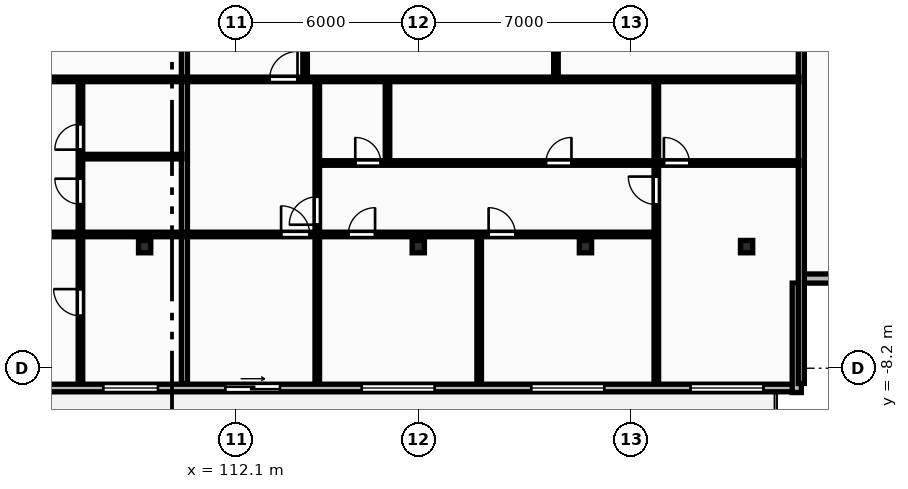
"""IFC4 building model, lengths in metres.
Left out: names, types, materials, properties, quantities, classifications, styles, units other than length and angle.
Written with IfcOpenShell. Run it as: python <this file> out.ifc"""

import sys

from ifc_helpers import new_model, si_unit, direction, frame, frame_2d, origin, origin_2d, place, context, subcontext, project, spatial, rectangle, i_section, extrude, element, fill, save


model = new_model("IFC4")
c1 = context("Model", 3, precision=1e-05, world=origin(), true_north=direction((0.0, 1.0)))
c2 = subcontext(c1, "Body", "Model", "MODEL_VIEW")
j1 = project(units=[si_unit("LENGTHUNIT", "METRE"), si_unit("PLANEANGLEUNIT", "RADIAN")], contexts=[c1])
p1 = place(None, origin())
s1 = spatial("IfcSite", under=j1, at=p1, CompositionType="ELEMENT")
p2 = place(p1, origin())
s2 = spatial("IfcBuilding", under=s1, at=p2, CompositionType="ELEMENT")
p3 = place(p2, frame((0.0, 0.0, 146.5)))
s3 = spatial("IfcBuildingStorey", under=s2, at=p3, CompositionType="ELEMENT", Elevation=146.5)
for number, where, z_axis, x_axis in (
    (1, (109.1, -4.2, 0.0), (0.0, 0.0, 1.0), (1.0, 0.0, 0.0)),
    (2, (118.1, -4.2, 0.0), (0.0, 0.0, 1.0), (1.0, 0.0, 0.0)),
    (3, (123.6, -4.2, 0.0), (0.0, 0.0, 1.0), (1.0, 0.0, 0.0)),
    (4, (128.9, -4.2, 0.0), (0.0, 0.0, 1.0), (1.0, 0.0, 0.0)),
):
    element("IfcColumn", number, at=place(p3, frame(where, z_axis=z_axis, x_axis=x_axis)), inside=s3, PredefinedType="COLUMN", context=c2, shape_type="SweptSolid", body=[
        extrude(i_section(OverallWidth=0.403, OverallDepth=0.406, WebThickness=0.027, FlangeThickness=0.043, FilletRadius=0.015, at=origin_2d()), origin(), (0.0, 0.0, 1.0), 3.6),
    ])
p4 = place(p3, frame((72.7, -8.85, 0.0), z_axis=(0.0, 0.0, 1.0), x_axis=(1.0, 0.0, 0.0)))
e5 = element("IfcWall", 5, at=p4, inside=s3, PredefinedType="STANDARD", context=c2, shape_type="SweptSolid", body=[
    extrude(rectangle(XDim=58.0, YDim=0.25, at=frame_2d((29.0, 0.0))), origin(), (0.0, 0.0, 1.0), 3.31),
])
p5 = place(p4, frame((6.835, 0.0, 0.85)))
e6 = element("IfcOpeningElement", 6, at=p5, cuts=e5, PredefinedType="OPENING", context=c2, shape_type="SweptSolid", body=[
    extrude(rectangle(XDim=2.4, YDim=1.9, at=frame_2d((1.2, 0.95))), frame((0.0, 0.135, 0.0), z_axis=(0.0, -1.0, 0.0), x_axis=(1.0, 0.0, 0.0)), (0.0, 0.0, 1.0), 0.27),
])
p6 = place(p4, frame((12.7, 0.0, 0.85)))
e7 = element("IfcOpeningElement", 7, at=p6, cuts=e5, PredefinedType="OPENING", context=c2, shape_type="SweptSolid", body=[
    extrude(rectangle(XDim=2.4, YDim=1.9, at=frame_2d((1.2, 0.95))), frame((0.0, 0.135, 0.0), z_axis=(0.0, -1.0, 0.0), x_axis=(1.0, 0.0, 0.0)), (0.0, 0.0, 1.0), 0.27),
])
p7 = place(p4, frame((1.555, 0.0, 0.0)))
e8 = element("IfcOpeningElement", 8, at=p7, cuts=e5, PredefinedType="OPENING", context=c2, shape_type="SweptSolid", body=[
    extrude(rectangle(XDim=1.8, YDim=2.2, at=frame_2d((0.9, 1.1))), frame((0.0, 0.135, 0.0), z_axis=(0.0, -1.0, 0.0), x_axis=(1.0, 0.0, 0.0)), (0.0, 0.0, 1.0), 0.27),
])
p8 = place(p4, frame((18.125, 0.0, 0.85)))
e9 = element("IfcOpeningElement", 9, at=p8, cuts=e5, PredefinedType="OPENING", context=c2, shape_type="SweptSolid", body=[
    extrude(rectangle(XDim=2.4, YDim=1.9, at=frame_2d((1.2, 0.95))), frame((0.0, 0.135, 0.0), z_axis=(0.0, -1.0, 0.0), x_axis=(1.0, 0.0, 0.0)), (0.0, 0.0, 1.0), 0.27),
])
p9 = place(p4, frame((27.429, 0.0, 0.0)))
e10 = element("IfcOpeningElement", 10, at=p9, cuts=e5, PredefinedType="OPENING", context=c2, shape_type="SweptSolid", body=[
    extrude(rectangle(XDim=1.8, YDim=2.2, at=frame_2d((0.9, 1.1))), frame((0.0, 0.135, 0.0), z_axis=(0.0, -1.0, 0.0), x_axis=(1.0, 0.0, 0.0)), (0.0, 0.0, 1.0), 0.27),
])
p10 = place(p4, frame((35.038, 0.0, 0.85)))
e11 = element("IfcOpeningElement", 11, at=p10, cuts=e5, PredefinedType="OPENING", context=c2, shape_type="SweptSolid", body=[
    extrude(rectangle(XDim=1.8, YDim=1.8, at=frame_2d((0.9, 0.9))), frame((0.0, 0.135, 0.0), z_axis=(0.0, -1.0, 0.0), x_axis=(1.0, 0.0, 0.0)), (0.0, 0.0, 1.0), 0.27),
])
p11 = place(p4, frame((43.541, 0.0, 0.85)))
e12 = element("IfcOpeningElement", 12, at=p11, cuts=e5, PredefinedType="OPENING", context=c2, shape_type="SweptSolid", body=[
    extrude(rectangle(XDim=2.4, YDim=1.9, at=frame_2d((1.2, 0.95))), frame((0.0, 0.135, 0.0), z_axis=(0.0, -1.0, 0.0), x_axis=(1.0, 0.0, 0.0)), (0.0, 0.0, 1.0), 0.27),
])
p12 = place(p4, frame((49.117, 0.0, 0.85)))
e13 = element("IfcOpeningElement", 13, at=p12, cuts=e5, PredefinedType="OPENING", context=c2, shape_type="SweptSolid", body=[
    extrude(rectangle(XDim=2.4, YDim=1.9, at=frame_2d((1.2, 0.95))), frame((0.0, 0.135, 0.0), z_axis=(0.0, -1.0, 0.0), x_axis=(1.0, 0.0, 0.0)), (0.0, 0.0, 1.0), 0.27),
])
p13 = place(p4, frame((39.053, 0.0, 0.0)))
e14 = element("IfcOpeningElement", 14, at=p13, cuts=e5, PredefinedType="OPENING", context=c2, shape_type="SweptSolid", body=[
    extrude(rectangle(XDim=1.8, YDim=2.2, at=frame_2d((0.9, 1.1))), frame((0.0, 0.135, 0.0), z_axis=(0.0, -1.0, 0.0), x_axis=(1.0, 0.0, 0.0)), (0.0, 0.0, 1.0), 0.27),
])
p14 = place(p4, frame((54.355, 0.0, 0.85)))
e15 = element("IfcOpeningElement", 15, at=p14, cuts=e5, PredefinedType="OPENING", context=c2, shape_type="SweptSolid", body=[
    extrude(rectangle(XDim=2.4, YDim=1.9, at=frame_2d((1.2, 0.95))), frame((0.0, 0.135, 0.0), z_axis=(0.0, -1.0, 0.0), x_axis=(1.0, 0.0, 0.0)), (0.0, 0.0, 1.0), 0.27),
])
for number, where, z_axis, x_axis in (
    (16, (130.55, -9.0, 0.0), (0.0, 0.0, 1.0), (0.0, 1.0, 0.0)),
    (17, (130.7, -5.25, 0.0), (0.0, 0.0, 1.0), (1.0, 0.0, 0.0)),
):
    element("IfcWall", number, at=place(p3, frame(where, z_axis=z_axis, x_axis=x_axis)), inside=s3, PredefinedType="STANDARD", context=c2, shape_type="SweptSolid", body=[
        extrude(rectangle(XDim=3.6, YDim=0.3, at=frame_2d((1.8, 0.0))), origin(), (0.0, 0.0, 1.0), 3.31),
    ])
for number, where, z_axis, x_axis in (
    (18, (130.7, -8.7, 0.0), (0.0, 0.0, 1.0), (0.0, 1.0, 0.0)),
    (19, (110.408, -8.7, 0.0), (0.0, 0.0, 1.0), (0.0, 1.0, 0.0)),
):
    element("IfcWall", number, at=place(p3, frame(where, z_axis=z_axis, x_axis=x_axis)), inside=s3, PredefinedType="PARTITIONING", context=c2, shape_type="SweptSolid", body=[
        extrude(rectangle(XDim=24.57, YDim=0.2, at=frame_2d((12.285, 0.0))), origin(), (0.0, 0.0, 1.0), 3.31),
    ])
p15 = place(p3, frame((107.048, -1.24, 0.0), z_axis=(0.0, 0.0, 1.0), x_axis=(1.0, 0.0, 0.0)))
e20 = element("IfcWall", 20, at=p15, inside=s3, PredefinedType="PARTITIONING", context=c2, shape_type="SweptSolid", body=[
    extrude(rectangle(XDim=3.28, YDim=0.15, at=frame_2d((1.64, 0.0))), origin(), (0.0, 0.0, 1.0), 3.31),
])
p16 = place(p3, frame((106.988, -8.7, 0.0), z_axis=(0.0, 0.0, 1.0), x_axis=(0.0, 1.0, 0.0)))
e21 = element("IfcWall", 21, at=p16, inside=s3, PredefinedType="PARTITIONING", context=c2, shape_type="SweptSolid", body=[
    extrude(rectangle(XDim=9.96, YDim=0.15, at=frame_2d((4.98, 0.0))), origin(), (0.0, 0.0, 1.0), 3.31),
])
p17 = place(p16, frame((5.894, 0.0, 0.0)))
e22 = element("IfcOpeningElement", 22, at=p17, cuts=e21, PredefinedType="OPENING", context=c2, shape_type="SweptSolid", body=[
    extrude(rectangle(XDim=0.84, YDim=2.04, at=frame_2d((0.42, 1.02))), frame((0.0, 0.085, 0.0), z_axis=(0.0, -1.0, 0.0), x_axis=(1.0, 0.0, 0.0)), (0.0, 0.0, 1.0), 0.17),
])
p18 = place(p16, frame((7.69, 0.0, 0.0)))
e23 = element("IfcOpeningElement", 23, at=p18, cuts=e21, PredefinedType="OPENING", context=c2, shape_type="SweptSolid", body=[
    extrude(rectangle(XDim=0.84, YDim=2.04, at=frame_2d((0.42, 1.02))), frame((0.0, 0.085, 0.0), z_axis=(0.0, -1.0, 0.0), x_axis=(1.0, 0.0, 0.0)), (0.0, 0.0, 1.0), 0.17),
])
p19 = place(p16, frame((2.223, 0.0, 0.0)))
e24 = element("IfcOpeningElement", 24, at=p19, cuts=e21, PredefinedType="OPENING", context=c2, shape_type="SweptSolid", body=[
    extrude(rectangle(XDim=0.88, YDim=2.06, at=frame_2d((0.44, 1.03))), frame((0.0, 0.085, 0.0), z_axis=(0.0, -1.0, 0.0), x_axis=(1.0, 0.0, 0.0)), (0.0, 0.0, 1.0), 0.17),
])
p20 = place(p3, frame((95.03, 1.3, 0.0), z_axis=(0.0, 0.0, 1.0), x_axis=(1.0, 0.0, 0.0)))
e25 = element("IfcWall", 25, at=p20, inside=s3, PredefinedType="PARTITIONING", context=c2, shape_type="SweptSolid", body=[
    extrude(rectangle(XDim=15.298, YDim=0.15, at=frame_2d((7.649, 0.0))), origin(), (0.0, 0.0, 1.0), 3.31),
])
p21 = place(p20, frame((2.72, 0.0, 0.0)))
e26 = element("IfcOpeningElement", 26, at=p21, cuts=e25, PredefinedType="OPENING", context=c2, shape_type="SweptSolid", body=[
    extrude(rectangle(XDim=0.92, YDim=2.08, at=frame_2d((0.46, 1.04))), frame((0.0, 0.085, 0.0), z_axis=(0.0, -1.0, 0.0), x_axis=(1.0, 0.0, 0.0)), (0.0, 0.0, 1.0), 0.17),
])
p22 = place(p3, frame((95.03, -3.8, 0.0), z_axis=(0.0, 0.0, 1.0), x_axis=(1.0, 0.0, 0.0)))
e27 = element("IfcWall", 27, at=p22, inside=s3, PredefinedType="PARTITIONING", context=c2, shape_type="SweptSolid", body=[
    extrude(rectangle(XDim=15.298, YDim=0.15, at=frame_2d((7.649, 0.0))), origin(), (0.0, 0.0, 1.0), 3.31),
])
p23 = place(p22, frame((7.179, 0.0, 0.0)))
e28 = element("IfcOpeningElement", 28, at=p23, cuts=e27, PredefinedType="OPENING", context=c2, shape_type="SweptSolid", body=[
    extrude(rectangle(XDim=0.94, YDim=2.1, at=frame_2d((0.47, 1.05))), frame((0.0, 0.085, 0.0), z_axis=(0.0, -1.0, 0.0), x_axis=(1.0, 0.0, 0.0)), (0.0, 0.0, 1.0), 0.17),
])
p24 = place(p3, frame((122.629, 1.34, 0.0), z_axis=(0.0, 0.0, 1.0), x_axis=(0.0, 1.0, 0.0)))
e29 = element("IfcWall", 29, at=p24, inside=s3, PredefinedType="PARTITIONING", context=c2, shape_type="SweptSolid", body=[
    extrude(rectangle(XDim=14.55, YDim=0.15, at=frame_2d((7.275, 0.0))), origin(), (0.0, 0.0, 1.0), 3.31),
])
p25 = place(p24, frame((3.177, 0.0, 0.0)))
e30 = element("IfcOpeningElement", 30, at=p25, cuts=e29, PredefinedType="OPENING", context=c2, shape_type="SweptSolid", body=[
    extrude(rectangle(XDim=0.84, YDim=2.04, at=frame_2d((0.42, 1.02))), frame((0.0, 0.085, 0.0), z_axis=(0.0, -1.0, 0.0), x_axis=(1.0, 0.0, 0.0)), (0.0, 0.0, 1.0), 0.17),
])
p26 = place(p24, frame((7.345, 0.0, 0.0)))
e31 = element("IfcOpeningElement", 31, at=p26, cuts=e29, PredefinedType="OPENING", context=c2, shape_type="SweptSolid", body=[
    extrude(rectangle(XDim=0.88, YDim=2.06, at=frame_2d((0.44, 1.03))), frame((0.0, 0.085, 0.0), z_axis=(0.0, -1.0, 0.0), x_axis=(1.0, 0.0, 0.0)), (0.0, 0.0, 1.0), 0.17),
])
p27 = place(p3, frame((114.378, 1.34, 0.0), z_axis=(0.0, 0.0, 1.0), x_axis=(0.0, 1.0, 0.0)))
e32 = element("IfcWall", 32, at=p27, inside=s3, PredefinedType="PARTITIONING", context=c2, shape_type="SweptSolid", body=[
    extrude(rectangle(XDim=14.55, YDim=0.15, at=frame_2d((7.275, 0.0))), origin(), (0.0, 0.0, 1.0), 3.31),
])
p28 = place(p27, frame((5.965, 0.0, 0.0)))
e33 = element("IfcOpeningElement", 33, at=p28, cuts=e32, PredefinedType="OPENING", context=c2, shape_type="SweptSolid", body=[
    extrude(rectangle(XDim=0.88, YDim=2.06, at=frame_2d((0.44, 1.03))), frame((0.0, 0.085, 0.0), z_axis=(0.0, -1.0, 0.0), x_axis=(1.0, 0.0, 0.0)), (0.0, 0.0, 1.0), 0.17),
])
p29 = place(p3, frame((117.088, -1.43, 0.0), z_axis=(0.0, 0.0, 1.0), x_axis=(0.0, 1.0, 0.0)))
e34 = element("IfcWall", 34, at=p29, inside=s3, PredefinedType="PARTITIONING", context=c2, shape_type="SweptSolid", body=[
    extrude(rectangle(XDim=2.69, YDim=0.15, at=frame_2d((1.345, 0.0))), origin(), (0.0, 0.0, 1.0), 3.31),
])
p30 = place(p3, frame((120.104, -8.7, 0.0), z_axis=(0.0, 0.0, 1.0), x_axis=(0.0, 1.0, 0.0)))
e35 = element("IfcWall", 35, at=p30, inside=s3, PredefinedType="PARTITIONING", context=c2, shape_type="SweptSolid", body=[
    extrude(rectangle(XDim=4.82, YDim=0.15, at=frame_2d((2.41, 0.0))), origin(), (0.0, 0.0, 1.0), 3.31),
])
p31 = place(p3, frame((114.778, -8.7, 0.0), z_axis=(0.0, 0.0, 1.0), x_axis=(0.0, 1.0, 0.0)))
e36 = element("IfcWall", 36, at=p31, inside=s3, PredefinedType="PARTITIONING", context=c2, shape_type="SweptSolid", body=[
    extrude(rectangle(XDim=9.96, YDim=0.15, at=frame_2d((4.98, 0.0))), origin(), (0.0, 0.0, 1.0), 3.31),
])
p32 = place(p31, frame((5.22, 0.0, 0.0)))
e37 = element("IfcOpeningElement", 37, at=p32, cuts=e36, PredefinedType="OPENING", context=c2, shape_type="SweptSolid", body=[
    extrude(rectangle(XDim=0.92, YDim=2.08, at=frame_2d((0.46, 1.04))), frame((0.0, 0.085, 0.0), z_axis=(0.0, -1.0, 0.0), x_axis=(1.0, 0.0, 0.0)), (0.0, 0.0, 1.0), 0.17),
])
p33 = place(p3, frame((125.93, -1.43, 0.0), z_axis=(0.0, 0.0, 1.0), x_axis=(0.0, 1.0, 0.0)))
e38 = element("IfcWall", 38, at=p33, inside=s3, PredefinedType="PARTITIONING", context=c2, shape_type="SweptSolid", body=[
    extrude(rectangle(XDim=2.69, YDim=0.15, at=frame_2d((1.345, 0.0))), origin(), (0.0, 0.0, 1.0), 3.31),
])
p34 = place(p3, frame((125.93, -8.7, 0.0), z_axis=(0.0, 0.0, 1.0), x_axis=(0.0, 1.0, 0.0)))
e39 = element("IfcWall", 39, at=p34, inside=s3, PredefinedType="PARTITIONING", context=c2, shape_type="SweptSolid", body=[
    extrude(rectangle(XDim=7.23, YDim=0.15, at=frame_2d((3.615, 0.0))), origin(), (0.0, 0.0, 1.0), 3.31),
])
p35 = place(p34, frame((5.884, 0.0, 0.0)))
e40 = element("IfcOpeningElement", 40, at=p35, cuts=e39, PredefinedType="OPENING", context=c2, shape_type="SweptSolid", body=[
    extrude(rectangle(XDim=0.92, YDim=2.08, at=frame_2d((0.46, 1.04))), frame((0.0, 0.085, 0.0), z_axis=(0.0, -1.0, 0.0), x_axis=(1.0, 0.0, 0.0)), (0.0, 0.0, 1.0), 0.17),
])
p36 = place(p3, frame((114.818, -1.45, 0.0), z_axis=(0.0, 0.0, 1.0), x_axis=(1.0, 0.0, 0.0)))
e41 = element("IfcWall", 41, at=p36, inside=s3, PredefinedType="PARTITIONING", context=c2, shape_type="SweptSolid", body=[
    extrude(rectangle(XDim=15.802, YDim=0.15, at=frame_2d((7.901, 0.0))), origin(), (0.0, 0.0, 1.0), 3.31),
])
p37 = place(p36, frame((1.21, 0.0, 0.0)))
e42 = element("IfcOpeningElement", 42, at=p37, cuts=e41, PredefinedType="OPENING", context=c2, shape_type="SweptSolid", body=[
    extrude(rectangle(XDim=0.84, YDim=2.04, at=frame_2d((0.42, 1.02))), frame((0.0, 0.085, 0.0), z_axis=(0.0, -1.0, 0.0), x_axis=(1.0, 0.0, 0.0)), (0.0, 0.0, 1.0), 0.17),
])
p38 = place(p36, frame((7.481, 0.0, 0.0)))
e43 = element("IfcOpeningElement", 43, at=p38, cuts=e41, PredefinedType="OPENING", context=c2, shape_type="SweptSolid", body=[
    extrude(rectangle(XDim=0.84, YDim=2.04, at=frame_2d((0.42, 1.02))), frame((0.0, 0.085, 0.0), z_axis=(0.0, -1.0, 0.0), x_axis=(1.0, 0.0, 0.0)), (0.0, 0.0, 1.0), 0.17),
])
p39 = place(p36, frame((11.362, 0.0, 0.0)))
e44 = element("IfcOpeningElement", 44, at=p39, cuts=e41, PredefinedType="OPENING", context=c2, shape_type="SweptSolid", body=[
    extrude(rectangle(XDim=0.84, YDim=2.04, at=frame_2d((0.42, 1.02))), frame((0.0, 0.085, 0.0), z_axis=(0.0, -1.0, 0.0), x_axis=(1.0, 0.0, 0.0)), (0.0, 0.0, 1.0), 0.17),
])
p40 = place(p3, frame((110.488, 1.3, 0.0), z_axis=(0.0, 0.0, 1.0), x_axis=(1.0, 0.0, 0.0)))
e45 = element("IfcWall", 45, at=p40, inside=s3, PredefinedType="PARTITIONING", context=c2, shape_type="SweptSolid", body=[
    extrude(rectangle(XDim=20.132, YDim=0.15, at=frame_2d((10.066, 0.0))), origin(), (0.0, 0.0, 1.0), 3.31),
])
p41 = place(p40, frame((2.72, 0.0, 0.0)))
e46 = element("IfcOpeningElement", 46, at=p41, cuts=e45, PredefinedType="OPENING", context=c2, shape_type="SweptSolid", body=[
    extrude(rectangle(XDim=0.92, YDim=2.08, at=frame_2d((0.46, 1.04))), frame((0.0, 0.085, 0.0), z_axis=(0.0, -1.0, 0.0), x_axis=(1.0, 0.0, 0.0)), (0.0, 0.0, 1.0), 0.17),
])
p42 = place(p3, frame((110.488, -3.8, 0.0), z_axis=(0.0, 0.0, 1.0), x_axis=(1.0, 0.0, 0.0)))
e47 = element("IfcWall", 47, at=p42, inside=s3, PredefinedType="PARTITIONING", context=c2, shape_type="SweptSolid", body=[
    extrude(rectangle(XDim=15.442, YDim=0.15, at=frame_2d((7.721, 0.0))), origin(), (0.0, 0.0, 1.0), 3.31),
])
p43 = place(p42, frame((3.1, 0.0, 0.0)))
e48 = element("IfcOpeningElement", 48, at=p43, cuts=e47, PredefinedType="OPENING", context=c2, shape_type="SweptSolid", body=[
    extrude(rectangle(XDim=0.94, YDim=2.1, at=frame_2d((0.47, 1.05))), frame((0.0, 0.085, 0.0), z_axis=(0.0, -1.0, 0.0), x_axis=(1.0, 0.0, 0.0)), (0.0, 0.0, 1.0), 0.17),
])
p44 = place(p42, frame((5.311, 0.0, 0.0)))
e49 = element("IfcOpeningElement", 49, at=p44, cuts=e47, PredefinedType="OPENING", context=c2, shape_type="SweptSolid", body=[
    extrude(rectangle(XDim=0.88, YDim=2.06, at=frame_2d((0.44, 1.03))), frame((0.0, 0.085, 0.0), z_axis=(0.0, -1.0, 0.0), x_axis=(1.0, 0.0, 0.0)), (0.0, 0.0, 1.0), 0.17),
])
p45 = place(p42, frame((9.926, 0.0, 0.0)))
e50 = element("IfcOpeningElement", 50, at=p45, cuts=e47, PredefinedType="OPENING", context=c2, shape_type="SweptSolid", body=[
    extrude(rectangle(XDim=0.88, YDim=2.06, at=frame_2d((0.44, 1.03))), frame((0.0, 0.085, 0.0), z_axis=(0.0, -1.0, 0.0), x_axis=(1.0, 0.0, 0.0)), (0.0, 0.0, 1.0), 0.17),
])
p46 = place(p10, origin())
e51 = element("IfcWindow", 51, at=p46, inside=s3, PartitioningType="SINGLE_PANEL", PredefinedType="WINDOW", context=c2, shape_type="SweptSolid", body=[
    extrude(rectangle(XDim=1.8, YDim=1.8, at=frame_2d((0.9, 0.9))), frame((0.0, 0.03, 0.0), z_axis=(0.0, -1.0, 0.0), x_axis=(1.0, 0.0, 0.0)), (0.0, 0.0, 1.0), 0.06),
])
fill(e11, e51)
p47 = place(p11, origin())
e52 = element("IfcWindow", 52, at=p47, inside=s3, PartitioningType="DOUBLE_PANEL_VERTICAL", PredefinedType="WINDOW", context=c2, shape_type="SweptSolid", body=[
    extrude(rectangle(XDim=2.4, YDim=1.9, at=frame_2d((1.2, 0.95))), frame((0.0, 0.03, 0.0), z_axis=(0.0, -1.0, 0.0), x_axis=(1.0, 0.0, 0.0)), (0.0, 0.0, 1.0), 0.06),
])
fill(e12, e52)
p48 = place(p12, origin())
e53 = element("IfcWindow", 53, at=p48, inside=s3, PartitioningType="DOUBLE_PANEL_VERTICAL", PredefinedType="WINDOW", context=c2, shape_type="SweptSolid", body=[
    extrude(rectangle(XDim=2.4, YDim=1.9, at=frame_2d((1.2, 0.95))), frame((0.0, 0.03, 0.0), z_axis=(0.0, -1.0, 0.0), x_axis=(1.0, 0.0, 0.0)), (0.0, 0.0, 1.0), 0.06),
])
fill(e13, e53)
p49 = place(p13, origin())
e54 = element("IfcDoor", 54, at=p49, inside=s3, OperationType="SLIDING_TO_RIGHT", PredefinedType="DOOR", context=c2, shape_type="SweptSolid", body=[
    extrude(rectangle(XDim=1.8, YDim=2.2, at=frame_2d((0.9, 1.1))), frame((0.0, 0.025, 0.0), z_axis=(0.0, -1.0, 0.0), x_axis=(1.0, 0.0, 0.0)), (0.0, 0.0, 1.0), 0.05),
])
fill(e14, e54)
p50 = place(p14, origin())
e55 = element("IfcWindow", 55, at=p50, inside=s3, PartitioningType="DOUBLE_PANEL_VERTICAL", PredefinedType="WINDOW", context=c2, shape_type="SweptSolid", body=[
    extrude(rectangle(XDim=2.4, YDim=1.9, at=frame_2d((1.2, 0.95))), frame((0.0, 0.03, 0.0), z_axis=(0.0, -1.0, 0.0), x_axis=(1.0, 0.0, 0.0)), (0.0, 0.0, 1.0), 0.06),
])
fill(e15, e55)
p51 = place(p17, origin())
e56 = element("IfcDoor", 56, at=p51, inside=s3, OperationType="SINGLE_SWING_RIGHT", PredefinedType="DOOR", context=c2, shape_type="SweptSolid", body=[
    extrude(rectangle(XDim=0.84, YDim=2.04, at=frame_2d((0.42, 1.02))), frame((0.0, 0.025, 0.0), z_axis=(0.0, -1.0, 0.0), x_axis=(1.0, 0.0, 0.0)), (0.0, 0.0, 1.0), 0.05),
])
fill(e22, e56)
p52 = place(p18, origin())
e57 = element("IfcDoor", 57, at=p52, inside=s3, OperationType="SINGLE_SWING_LEFT", PredefinedType="DOOR", context=c2, shape_type="SweptSolid", body=[
    extrude(rectangle(XDim=0.84, YDim=2.04, at=frame_2d((0.42, 1.02))), frame((0.0, 0.025, 0.0), z_axis=(0.0, -1.0, 0.0), x_axis=(1.0, 0.0, 0.0)), (0.0, 0.0, 1.0), 0.05),
])
fill(e23, e57)
p53 = place(p19, origin())
e58 = element("IfcDoor", 58, at=p53, inside=s3, OperationType="SINGLE_SWING_RIGHT", PredefinedType="DOOR", context=c2, shape_type="SweptSolid", body=[
    extrude(rectangle(XDim=0.88, YDim=2.06, at=frame_2d((0.44, 1.03))), frame((0.0, 0.025, 0.0), z_axis=(0.0, -1.0, 0.0), x_axis=(1.0, 0.0, 0.0)), (0.0, 0.0, 1.0), 0.05),
])
fill(e24, e58)
p54 = place(p32, origin())
e59 = element("IfcDoor", 59, at=p54, inside=s3, OperationType="SINGLE_SWING_LEFT", PredefinedType="DOOR", context=c2, shape_type="SweptSolid", body=[
    extrude(rectangle(XDim=0.92, YDim=2.08, at=frame_2d((0.46, 1.04))), frame((0.0, 0.025, 0.0), z_axis=(0.0, -1.0, 0.0), x_axis=(1.0, 0.0, 0.0)), (0.0, 0.0, 1.0), 0.05),
])
fill(e37, e59)
p55 = place(p35, origin())
e60 = element("IfcDoor", 60, at=p55, inside=s3, OperationType="SINGLE_SWING_RIGHT", PredefinedType="DOOR", context=c2, shape_type="SweptSolid", body=[
    extrude(rectangle(XDim=0.92, YDim=2.08, at=frame_2d((0.46, 1.04))), frame((0.0, 0.025, 0.0), z_axis=(0.0, -1.0, 0.0), x_axis=(1.0, 0.0, 0.0)), (0.0, 0.0, 1.0), 0.05),
])
fill(e40, e60)
p56 = place(p37, origin())
e61 = element("IfcDoor", 61, at=p56, inside=s3, OperationType="SINGLE_SWING_LEFT", PredefinedType="DOOR", context=c2, shape_type="SweptSolid", body=[
    extrude(rectangle(XDim=0.84, YDim=2.04, at=frame_2d((0.42, 1.02))), frame((0.0, 0.025, 0.0), z_axis=(0.0, -1.0, 0.0), x_axis=(1.0, 0.0, 0.0)), (0.0, 0.0, 1.0), 0.05),
])
fill(e42, e61)
p57 = place(p38, origin())
e62 = element("IfcDoor", 62, at=p57, inside=s3, OperationType="SINGLE_SWING_RIGHT", PredefinedType="DOOR", context=c2, shape_type="SweptSolid", body=[
    extrude(rectangle(XDim=0.84, YDim=2.04, at=frame_2d((0.42, 1.02))), frame((0.0, 0.025, 0.0), z_axis=(0.0, -1.0, 0.0), x_axis=(1.0, 0.0, 0.0)), (0.0, 0.0, 1.0), 0.05),
])
fill(e43, e62)
p58 = place(p39, origin())
e63 = element("IfcDoor", 63, at=p58, inside=s3, OperationType="SINGLE_SWING_LEFT", PredefinedType="DOOR", context=c2, shape_type="SweptSolid", body=[
    extrude(rectangle(XDim=0.84, YDim=2.04, at=frame_2d((0.42, 1.02))), frame((0.0, 0.025, 0.0), z_axis=(0.0, -1.0, 0.0), x_axis=(1.0, 0.0, 0.0)), (0.0, 0.0, 1.0), 0.05),
])
fill(e44, e63)
p59 = place(p41, origin())
e64 = element("IfcDoor", 64, at=p59, inside=s3, OperationType="SINGLE_SWING_RIGHT", PredefinedType="DOOR", context=c2, shape_type="SweptSolid", body=[
    extrude(rectangle(XDim=0.92, YDim=2.08, at=frame_2d((0.46, 1.04))), frame((0.0, 0.025, 0.0), z_axis=(0.0, -1.0, 0.0), x_axis=(1.0, 0.0, 0.0)), (0.0, 0.0, 1.0), 0.05),
])
fill(e46, e64)
p60 = place(p43, origin())
e65 = element("IfcDoor", 65, at=p60, inside=s3, OperationType="SINGLE_SWING_LEFT", PredefinedType="DOOR", context=c2, shape_type="SweptSolid", body=[
    extrude(rectangle(XDim=0.94, YDim=2.1, at=frame_2d((0.47, 1.05))), frame((0.0, 0.025, 0.0), z_axis=(0.0, -1.0, 0.0), x_axis=(1.0, 0.0, 0.0)), (0.0, 0.0, 1.0), 0.05),
])
fill(e48, e65)
p61 = place(p44, origin())
e66 = element("IfcDoor", 66, at=p61, inside=s3, OperationType="SINGLE_SWING_RIGHT", PredefinedType="DOOR", context=c2, shape_type="SweptSolid", body=[
    extrude(rectangle(XDim=0.88, YDim=2.06, at=frame_2d((0.44, 1.03))), frame((0.0, 0.025, 0.0), z_axis=(0.0, -1.0, 0.0), x_axis=(1.0, 0.0, 0.0)), (0.0, 0.0, 1.0), 0.05),
])
fill(e49, e66)
p62 = place(p45, origin())
e67 = element("IfcDoor", 67, at=p62, inside=s3, OperationType="SINGLE_SWING_LEFT", PredefinedType="DOOR", context=c2, shape_type="SweptSolid", body=[
    extrude(rectangle(XDim=0.88, YDim=2.06, at=frame_2d((0.44, 1.03))), frame((0.0, 0.025, 0.0), z_axis=(0.0, -1.0, 0.0), x_axis=(1.0, 0.0, 0.0)), (0.0, 0.0, 1.0), 0.05),
])
fill(e50, e67)
save(model, sys.argv[1])
